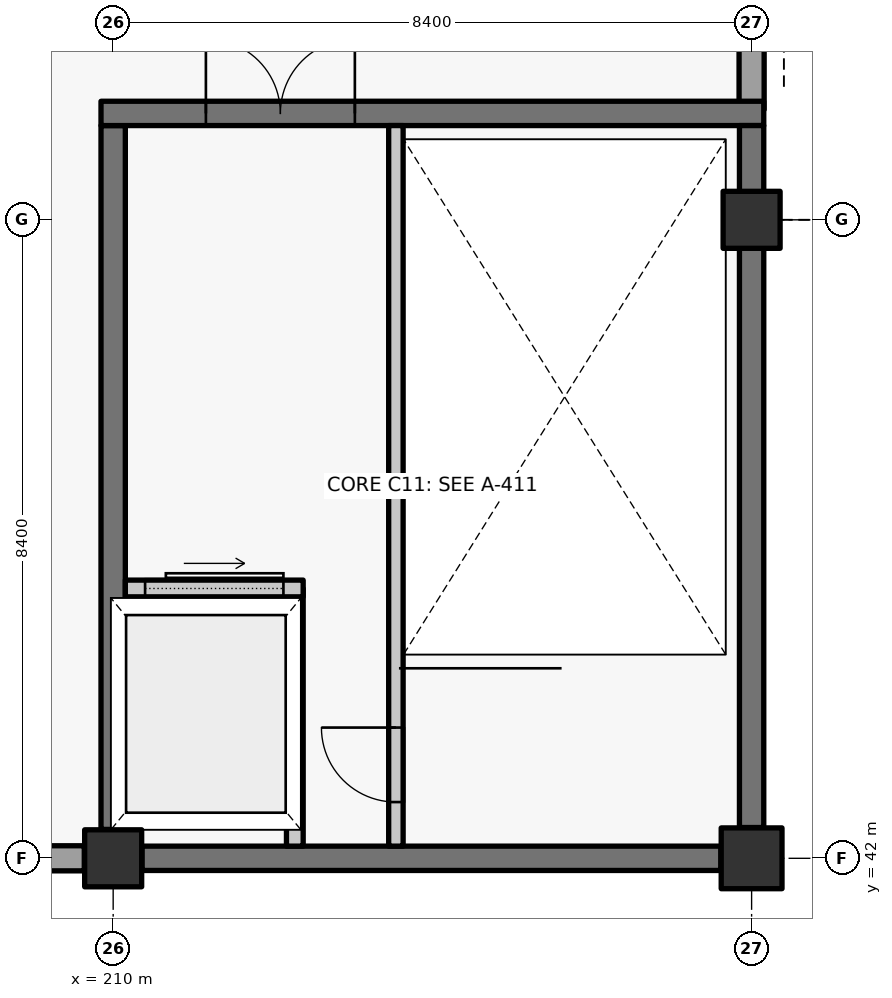
"""IFC4 building model, lengths in metres.
Left out: names, types, materials, properties, quantities, classifications, styles, units other than length and angle.
Written with IfcOpenShell. Run it as: python <this file> out.ifc"""

import sys

from ifc_helpers import new_model, si_unit, direction, frame, frame_2d, origin, origin_2d, place, context, subcontext, project, spatial, rectangle, extrude, element, fill, save


model = new_model("IFC4")
c1 = context("Model", 3, precision=1e-05, world=origin(), true_north=direction((0.0, 1.0)))
c2 = subcontext(c1, "Body", "Model", "MODEL_VIEW")
j1 = project(units=[si_unit("LENGTHUNIT", "METRE"), si_unit("PLANEANGLEUNIT", "RADIAN")], contexts=[c1])
p1 = place(None, origin())
s1 = spatial("IfcSite", under=j1, at=p1, CompositionType="ELEMENT")
p2 = place(p1, origin())
s2 = spatial("IfcBuilding", under=s1, at=p2, CompositionType="ELEMENT")
p3 = place(p2, frame((0.0, 0.0, 6.0)))
s3 = spatial("IfcBuildingStorey", under=s2, at=p3, CompositionType="ELEMENT", Elevation=6.0)
p4 = place(p3, frame((210.0, 42.0, 0.0), z_axis=(0.0, 0.0, 1.0), x_axis=(1.0, 0.0, 0.0)))
e1 = element("IfcColumn", 1, at=p4, inside=s3, PredefinedType="COLUMN", context=c2, shape_type="SweptSolid", body=[
    extrude(rectangle(XDim=0.75, YDim=0.75, at=origin_2d()), origin(), (0.0, 0.0, 1.0), 5.4),
])
p5 = place(p3, frame((218.4, 42.0, 0.0), z_axis=(0.0, 0.0, 1.0), x_axis=(1.0, 0.0, 0.0)))
e2 = element("IfcColumn", 2, at=p5, inside=s3, PredefinedType="COLUMN", context=c2, shape_type="SweptSolid", body=[
    extrude(rectangle(XDim=0.8, YDim=0.8, at=origin_2d()), origin(), (0.0, 0.0, 1.0), 5.4),
])
p6 = place(p3, frame((218.4, 50.4, 0.0), z_axis=(0.0, 0.0, 1.0), x_axis=(1.0, 0.0, 0.0)))
e3 = element("IfcColumn", 3, at=p6, inside=s3, PredefinedType="COLUMN", context=c2, shape_type="SweptSolid", body=[
    extrude(rectangle(XDim=0.75, YDim=0.75, at=origin_2d()), origin(), (0.0, 0.0, 1.0), 5.4),
])
p7 = place(p3, frame((218.4, 58.42, 0.0), z_axis=(0.0, 0.0, 1.0), x_axis=(0.0, -1.0, 0.0)))
e4 = element("IfcWall", 4, at=p7, inside=s3, PredefinedType="SOLIDWALL", context=c2, shape_type="SweptSolid", body=[
    extrude(rectangle(XDim=6.57, YDim=0.33, at=frame_2d((3.285, 0.0))), origin(), (0.0, 0.0, 1.0), 5.13),
])
p8 = place(p7, frame((1.935, 0.0, 1.5)))
e5 = element("IfcOpeningElement", 5, at=p8, cuts=e4, PredefinedType="OPENING", context=c2, shape_type="SweptSolid", body=[
    extrude(rectangle(XDim=2.8, YDim=1.15, at=frame_2d((1.4, 0.575))), frame((0.0, 0.175, 0.0), z_axis=(0.0, -1.0, 0.0), x_axis=(1.0, 0.0, 0.0)), (0.0, 0.0, 1.0), 0.35),
])
p9 = place(p3, frame((209.62, 42.0, 0.0), z_axis=(0.0, 0.0, 1.0), x_axis=(-1.0, 0.0, 0.0)))
e6 = element("IfcWall", 6, at=p9, inside=s3, PredefinedType="SOLIDWALL", context=c2, shape_type="SweptSolid", body=[
    extrude(rectangle(XDim=7.64, YDim=0.33, at=frame_2d((3.82, 0.0))), origin(), (0.0, 0.0, 1.0), 5.13),
])
p10 = place(p9, frame((3.37, 0.0, 1.0)))
e7 = element("IfcOpeningElement", 7, at=p10, cuts=e6, PredefinedType="OPENING", context=c2, shape_type="SweptSolid", body=[
    extrude(rectangle(XDim=0.9, YDim=2.1, at=frame_2d((0.45, 1.05))), frame((0.0, 0.175, 0.0), z_axis=(0.0, -1.0, 0.0), x_axis=(1.0, 0.0, 0.0)), (0.0, 0.0, 1.0), 0.35),
])
p11 = place(p3, frame((217.995, 42.0, 0.0), z_axis=(0.0, 0.0, 1.0), x_axis=(-1.0, 0.0, 0.0)))
e8 = element("IfcWall", 8, at=p11, inside=s3, PredefinedType="SHEAR", context=c2, shape_type="SweptSolid", body=[
    extrude(rectangle(XDim=7.615, YDim=0.32, at=frame_2d((3.808, 0.0))), origin(), (0.0, 0.0, 1.0), 5.12),
])
p12 = place(p3, frame((210.0, 42.38, 0.0), z_axis=(0.0, 0.0, 1.0), x_axis=(0.0, 1.0, 0.0)))
e9 = element("IfcWall", 9, at=p12, inside=s3, PredefinedType="SHEAR", context=c2, shape_type="SweptSolid", body=[
    extrude(rectangle(XDim=9.26, YDim=0.32, at=frame_2d((4.63, 0.0))), origin(), (0.0, 0.0, 1.0), 5.12),
])
p13 = place(p3, frame((209.84, 51.8, 0.0), z_axis=(0.0, 0.0, 1.0), x_axis=(1.0, 0.0, 0.0)))
e10 = element("IfcWall", 10, at=p13, inside=s3, PredefinedType="SHEAR", context=c2, shape_type="SweptSolid", body=[
    extrude(rectangle(XDim=8.72, YDim=0.32, at=frame_2d((4.36, 0.0))), origin(), (0.0, 0.0, 1.0), 5.12),
])
p14 = place(p13, frame((1.38, 0.0, 0.0)))
e11 = element("IfcOpeningElement", 11, at=p14, cuts=e10, PredefinedType="OPENING", context=c2, shape_type="SweptSolid", body=[
    extrude(rectangle(XDim=1.96, YDim=2.2, at=frame_2d((0.98, 1.1))), frame((0.0, 0.17, 0.0), z_axis=(0.0, -1.0, 0.0), x_axis=(1.0, 0.0, 0.0)), (0.0, 0.0, 1.0), 0.34),
])
p15 = place(p3, frame((218.4, 51.64, 0.0), z_axis=(0.0, 0.0, 1.0), x_axis=(0.0, -1.0, 0.0)))
e12 = element("IfcWall", 12, at=p15, inside=s3, PredefinedType="SHEAR", context=c2, shape_type="SweptSolid", body=[
    extrude(rectangle(XDim=9.235, YDim=0.32, at=frame_2d((4.617, 0.0))), origin(), (0.0, 0.0, 1.0), 5.12),
])
p16 = place(p3, frame((213.72, 42.16, 0.0), z_axis=(0.0, 0.0, 1.0), x_axis=(0.0, 1.0, 0.0)))
e13 = element("IfcWall", 13, at=p16, inside=s3, PredefinedType="SOLIDWALL", context=c2, shape_type="SweptSolid", body=[
    extrude(rectangle(XDim=9.48, YDim=0.19, at=frame_2d((4.74, 0.0))), origin(), (0.0, 0.0, 1.0), 5.12),
])
p17 = place(p16, frame((0.58, 0.0, 0.0)))
e14 = element("IfcOpeningElement", 14, at=p17, cuts=e13, PredefinedType="OPENING", context=c2, shape_type="SweptSolid", body=[
    extrude(rectangle(XDim=0.98, YDim=2.15, at=frame_2d((0.49, 1.075))), frame((0.0, 0.105, 0.0), z_axis=(0.0, -1.0, 0.0), x_axis=(1.0, 0.0, 0.0)), (0.0, 0.0, 1.0), 0.21),
])
p18 = place(p3, frame((212.39, 42.16, 0.0), z_axis=(0.0, 0.0, 1.0), x_axis=(0.0, 1.0, 0.0)))
e15 = element("IfcWall", 15, at=p18, inside=s3, PredefinedType="SOLIDWALL", context=c2, shape_type="SweptSolid", body=[
    extrude(rectangle(XDim=3.39, YDim=0.22, at=frame_2d((1.695, 0.0))), origin(), (0.0, 0.0, 1.0), 5.12),
])
p19 = place(p3, frame((210.16, 45.55, 0.0), z_axis=(0.0, 0.0, 1.0), x_axis=(1.0, 0.0, 0.0)))
e16 = element("IfcWall", 16, at=p19, inside=s3, PredefinedType="SOLIDWALL", context=c2, shape_type="SweptSolid", body=[
    extrude(rectangle(XDim=2.34, YDim=0.22, at=frame_2d((1.17, 0.0))), origin(), (0.0, 0.0, 1.0), 5.12),
])
p20 = place(p19, frame((0.26, 0.0, 0.0)))
e17 = element("IfcOpeningElement", 17, at=p20, cuts=e16, PredefinedType="OPENING", context=c2, shape_type="SweptSolid", body=[
    extrude(rectangle(XDim=1.82, YDim=2.4, at=frame_2d((0.91, 1.2))), frame((0.0, 0.12, 0.0), z_axis=(0.0, -1.0, 0.0), x_axis=(1.0, 0.0, 0.0)), (0.0, 0.0, 1.0), 0.24),
])
p21 = place(p17, origin())
e18 = element("IfcDoor", 18, at=p21, inside=s3, OperationType="SINGLE_SWING_RIGHT", PredefinedType="DOOR", context=c2, shape_type="SweptSolid", body=[
    extrude(rectangle(XDim=0.98, YDim=2.15, at=frame_2d((0.49, 1.075))), frame((0.0, 0.025, 0.0), z_axis=(0.0, -1.0, 0.0), x_axis=(1.0, 0.0, 0.0)), (0.0, 0.0, 1.0), 0.05),
])
fill(e14, e18)
p22 = place(p14, origin())
e19 = element("IfcDoor", 19, at=p22, inside=s3, OperationType="DOUBLE_DOOR_SINGLE_SWING", PredefinedType="DOOR", context=c2, shape_type="SweptSolid", body=[
    extrude(rectangle(XDim=1.96, YDim=2.2, at=frame_2d((0.98, 1.1))), frame((0.0, 0.025, 0.0), z_axis=(0.0, -1.0, 0.0), x_axis=(1.0, 0.0, 0.0)), (0.0, 0.0, 1.0), 0.05),
])
fill(e11, e19)
p23 = place(p20, origin())
e20 = element("IfcDoor", 20, at=p23, inside=s3, OperationType="SLIDING_TO_RIGHT", PredefinedType="DOOR", context=c2, shape_type="SweptSolid", body=[
    extrude(rectangle(XDim=1.82, YDim=2.4, at=frame_2d((0.91, 1.2))), frame((0.0, 0.025, 0.0), z_axis=(0.0, -1.0, 0.0), x_axis=(1.0, 0.0, 0.0)), (0.0, 0.0, 1.0), 0.05),
])
fill(e17, e20)
save(model, sys.argv[1])
